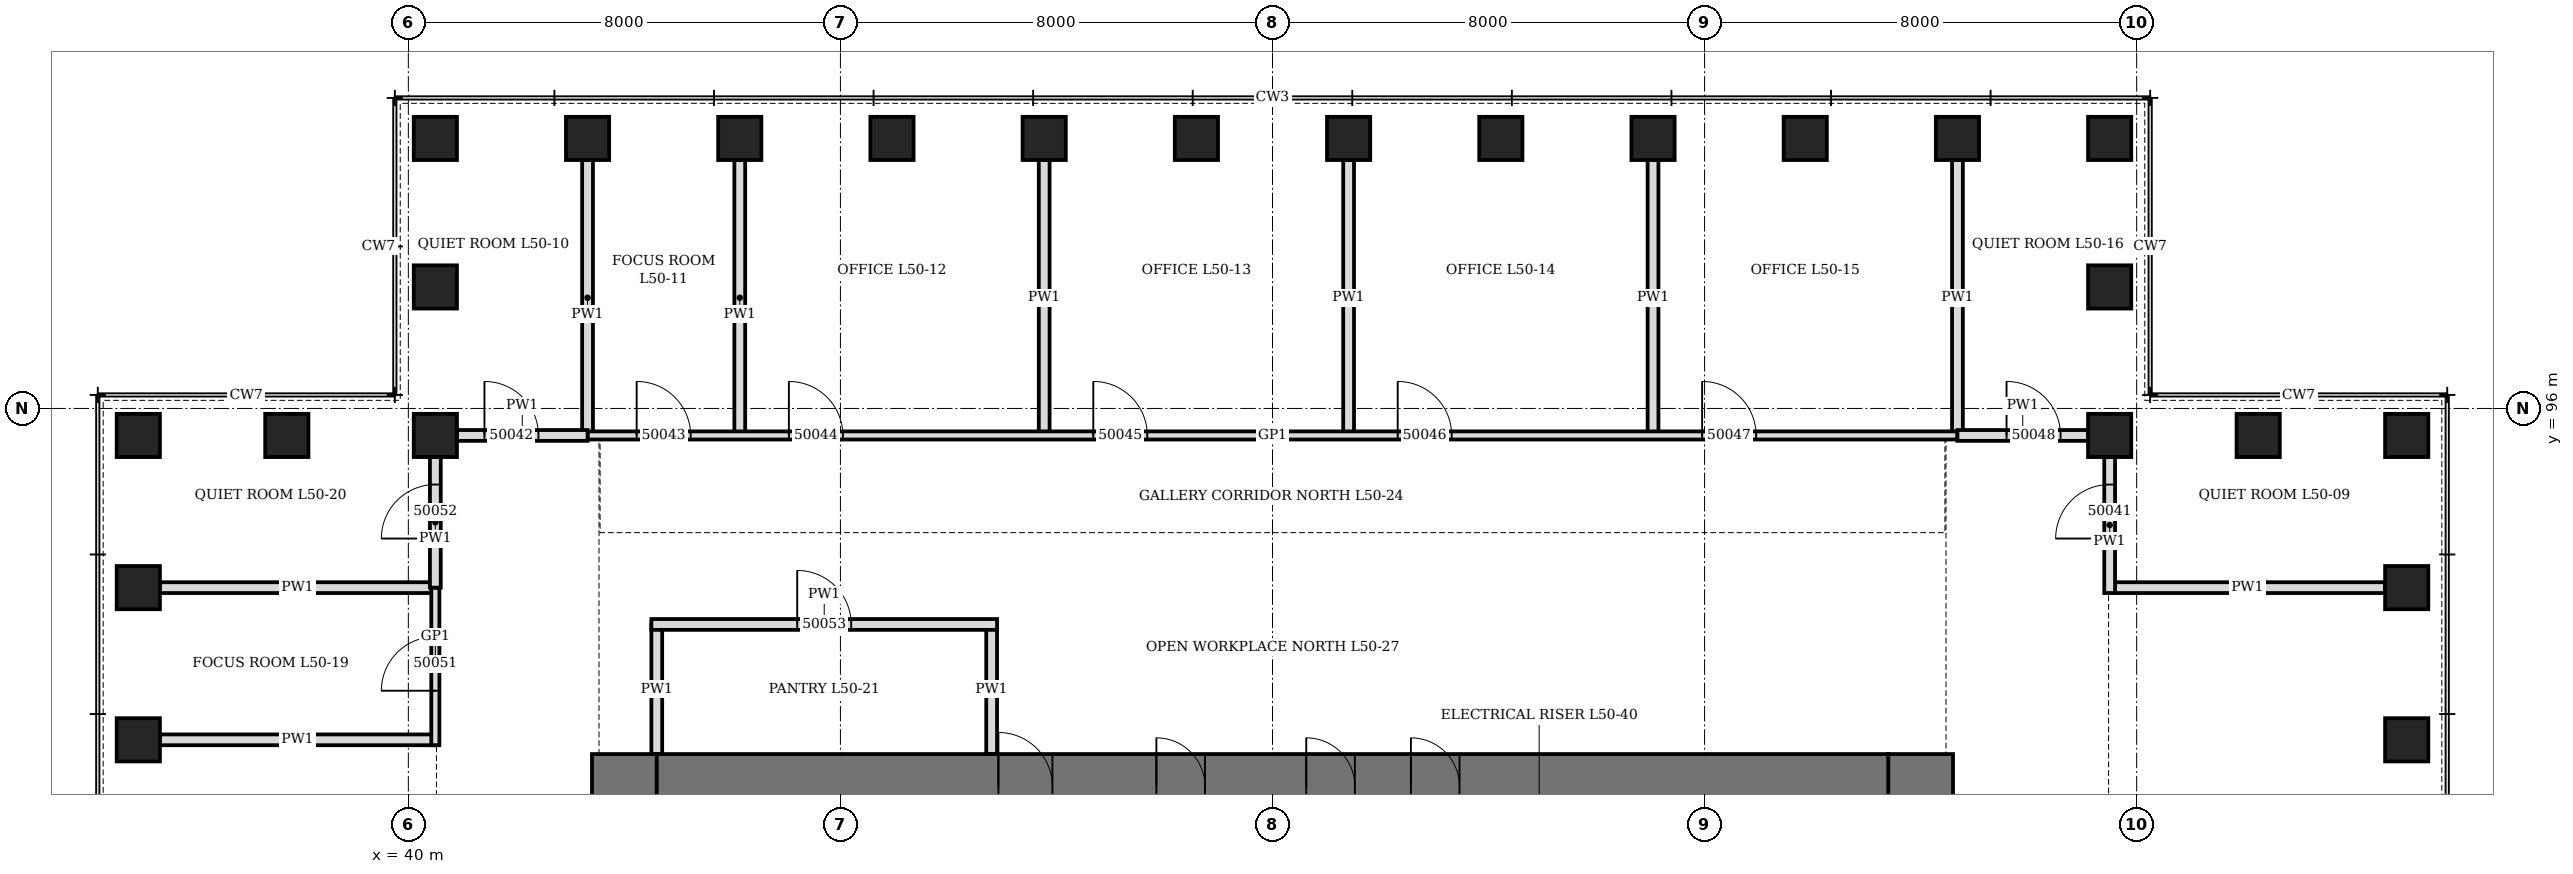
"""IFC4 building model, lengths in metres.
Left out: names, types, materials, properties, quantities, classifications, styles, units other than length and angle.
Written with IfcOpenShell. Run it as: python <this file> out.ifc"""

import sys

from ifc_helpers import new_model, si_unit, direction, frame, frame_2d, origin, origin_2d, place, context, subcontext, project, spatial, rectangle, hollow_rectangle, extrude, element, fill, save


model = new_model("IFC4")
c1 = context("Model", 3, precision=1e-05, world=origin(), true_north=direction((0.0, 1.0)))
c2 = subcontext(c1, "Body", "Model", "MODEL_VIEW")
j1 = project(units=[si_unit("LENGTHUNIT", "METRE"), si_unit("PLANEANGLEUNIT", "RADIAN")], contexts=[c1])
p1 = place(None, origin())
s1 = spatial("IfcSite", under=j1, at=p1, CompositionType="ELEMENT")
p2 = place(p1, origin())
s2 = spatial("IfcBuilding", under=s1, at=p2, CompositionType="ELEMENT")
p3 = place(p2, frame((0.0, 0.0, 223.3)))
s3 = spatial("IfcBuildingStorey", under=s2, at=p3, CompositionType="ELEMENT", Elevation=223.3)
for number, where, z_axis, x_axis in (
    (1, (77.0, 89.864, 0.0), (0.0, 0.0, 1.0), (0.0, 1.0, 0.0)),
    (2, (77.0, 92.682, 0.0), (0.0, 0.0, 1.0), (0.0, 1.0, 0.0)),
    (3, (77.0, 95.5, 0.0), (0.0, 0.0, 1.0), (1.0, 0.0, 0.0)),
    (4, (74.25, 95.5, 0.0), (0.0, 0.0, 1.0), (1.0, 0.0, 0.0)),
    (5, (71.5, 95.5, 0.0), (0.0, 0.0, 1.0), (0.0, 1.0, 0.0)),
    (6, (71.5, 98.25, 0.0), (0.0, 0.0, 1.0), (0.0, 1.0, 0.0)),
    (7, (71.5, 101.0, 0.0), (0.0, 0.0, 1.0), (1.0, 0.0, 0.0)),
    (8, (68.682, 101.0, 0.0), (0.0, 0.0, 1.0), (1.0, 0.0, 0.0)),
    (9, (65.864, 101.0, 0.0), (0.0, 0.0, 1.0), (1.0, 0.0, 0.0)),
    (10, (63.045, 101.0, 0.0), (0.0, 0.0, 1.0), (1.0, 0.0, 0.0)),
    (11, (60.227, 101.0, 0.0), (0.0, 0.0, 1.0), (1.0, 0.0, 0.0)),
    (12, (57.409, 101.0, 0.0), (0.0, 0.0, 1.0), (1.0, 0.0, 0.0)),
    (13, (54.591, 101.0, 0.0), (0.0, 0.0, 1.0), (1.0, 0.0, 0.0)),
    (14, (51.773, 101.0, 0.0), (0.0, 0.0, 1.0), (1.0, 0.0, 0.0)),
    (15, (48.955, 101.0, 0.0), (0.0, 0.0, 1.0), (1.0, 0.0, 0.0)),
    (16, (46.136, 101.0, 0.0), (0.0, 0.0, 1.0), (1.0, 0.0, 0.0)),
    (17, (43.318, 101.0, 0.0), (0.0, 0.0, 1.0), (1.0, 0.0, 0.0)),
    (18, (40.5, 101.0, 0.0), (0.0, 0.0, 1.0), (0.0, 1.0, 0.0)),
    (19, (40.5, 98.25, 0.0), (0.0, 0.0, 1.0), (0.0, 1.0, 0.0)),
    (20, (40.5, 95.5, 0.0), (0.0, 0.0, 1.0), (1.0, 0.0, 0.0)),
    (21, (37.75, 95.5, 0.0), (0.0, 0.0, 1.0), (1.0, 0.0, 0.0)),
    (22, (35.0, 95.5, 0.0), (0.0, 0.0, 1.0), (0.0, 1.0, 0.0)),
    (23, (35.0, 92.682, 0.0), (0.0, 0.0, 1.0), (0.0, 1.0, 0.0)),
    (24, (35.0, 89.864, 0.0), (0.0, 0.0, 1.0), (0.0, 1.0, 0.0)),
):
    element("IfcColumn", number, at=place(p3, frame(where, z_axis=z_axis, x_axis=x_axis)), inside=s3, PredefinedType="COLUMN", context=c2, shape_type="SweptSolid", body=[
        extrude(hollow_rectangle(XDim=0.8, YDim=0.8, WallThickness=0.08, at=origin_2d()), origin(), (0.0, 0.0, 1.0), 4.2),
    ])
p4 = place(p3, frame((44.0, 70.4, 0.0), z_axis=(0.0, 0.0, 1.0), x_axis=(0.0, 1.0, 0.0)))
e25 = element("IfcWall", 25, at=p4, inside=s3, PredefinedType="SHEAR", context=c2, shape_type="SweptSolid", body=[
    extrude(rectangle(XDim=19.2, YDim=1.2, at=frame_2d((9.6, 0.0))), origin(), (0.0, 0.0, 1.0), 4.2),
])
p5 = place(p4, frame((8.6, 0.0, 0.0)))
e26 = element("IfcOpeningElement", 26, at=p5, cuts=e25, PredefinedType="OPENING", context=c2, shape_type="SweptSolid", body=[
    extrude(rectangle(XDim=2.0, YDim=2.4, at=frame_2d((1.0, 1.2))), frame((0.0, 0.61, 0.0), z_axis=(0.0, -1.0, 0.0), x_axis=(1.0, 0.0, 0.0)), (0.0, 0.0, 1.0), 1.22),
])
p6 = place(p3, frame((68.0, 70.4, 0.0), z_axis=(0.0, 0.0, 1.0), x_axis=(0.0, 1.0, 0.0)))
e27 = element("IfcWall", 27, at=p6, inside=s3, PredefinedType="SHEAR", context=c2, shape_type="SweptSolid", body=[
    extrude(rectangle(XDim=19.2, YDim=1.2, at=frame_2d((9.6, 0.0))), origin(), (0.0, 0.0, 1.0), 4.2),
])
p7 = place(p6, frame((8.6, 0.0, 0.0)))
e28 = element("IfcOpeningElement", 28, at=p7, cuts=e27, PredefinedType="OPENING", context=c2, shape_type="SweptSolid", body=[
    extrude(rectangle(XDim=2.0, YDim=2.4, at=frame_2d((1.0, 1.2))), frame((0.0, 0.61, 0.0), z_axis=(0.0, -1.0, 0.0), x_axis=(1.0, 0.0, 0.0)), (0.0, 0.0, 1.0), 1.22),
])
p8 = place(p3, frame((44.6, 89.0, 0.0), z_axis=(0.0, 0.0, 1.0), x_axis=(1.0, 0.0, 0.0)))
e29 = element("IfcWall", 29, at=p8, inside=s3, PredefinedType="SHEAR", context=c2, shape_type="SweptSolid", body=[
    extrude(rectangle(XDim=22.8, YDim=1.2, at=frame_2d((11.4, 0.0))), origin(), (0.0, 0.0, 1.0), 4.2),
])
p9 = place(p8, frame((6.325, 0.0, 0.0)))
e30 = element("IfcOpeningElement", 30, at=p9, cuts=e29, PredefinedType="OPENING", context=c2, shape_type="SweptSolid", body=[
    extrude(rectangle(XDim=1.0, YDim=2.1, at=frame_2d((0.5, 1.05))), frame((0.0, 0.61, 0.0), z_axis=(0.0, -1.0, 0.0), x_axis=(1.0, 0.0, 0.0)), (0.0, 0.0, 1.0), 1.22),
])
p10 = place(p8, frame((9.25, 0.0, 0.0)))
e31 = element("IfcOpeningElement", 31, at=p10, cuts=e29, PredefinedType="OPENING", context=c2, shape_type="SweptSolid", body=[
    extrude(rectangle(XDim=0.9, YDim=2.1, at=frame_2d((0.45, 1.05))), frame((0.0, 0.61, 0.0), z_axis=(0.0, -1.0, 0.0), x_axis=(1.0, 0.0, 0.0)), (0.0, 0.0, 1.0), 1.22),
])
p11 = place(p8, frame((12.025, 0.0, 0.0)))
e32 = element("IfcOpeningElement", 32, at=p11, cuts=e29, PredefinedType="OPENING", context=c2, shape_type="SweptSolid", body=[
    extrude(rectangle(XDim=0.9, YDim=2.1, at=frame_2d((0.45, 1.05))), frame((0.0, 0.61, 0.0), z_axis=(0.0, -1.0, 0.0), x_axis=(1.0, 0.0, 0.0)), (0.0, 0.0, 1.0), 1.22),
])
p12 = place(p8, frame((13.962, 0.0, 0.0)))
e33 = element("IfcOpeningElement", 33, at=p12, cuts=e29, PredefinedType="OPENING", context=c2, shape_type="SweptSolid", body=[
    extrude(rectangle(XDim=0.9, YDim=2.1, at=frame_2d((0.45, 1.05))), frame((0.0, 0.61, 0.0), z_axis=(0.0, -1.0, 0.0), x_axis=(1.0, 0.0, 0.0)), (0.0, 0.0, 1.0), 1.22),
])
for number, where, z_axis, x_axis in (
    (34, (71.5, 92.682, 0.0), (0.0, 0.0, 1.0), (1.0, 0.0, 0.0)),
    (35, (43.318, 95.5, 0.0), (0.0, 0.0, 1.0), (0.0, 1.0, 0.0)),
    (36, (46.136, 95.5, 0.0), (0.0, 0.0, 1.0), (0.0, 1.0, 0.0)),
    (37, (51.773, 95.5, 0.0), (0.0, 0.0, 1.0), (0.0, 1.0, 0.0)),
    (38, (57.409, 95.5, 0.0), (0.0, 0.0, 1.0), (0.0, 1.0, 0.0)),
    (39, (63.045, 95.5, 0.0), (0.0, 0.0, 1.0), (0.0, 1.0, 0.0)),
    (40, (68.682, 95.5, 0.0), (0.0, 0.0, 1.0), (0.0, 1.0, 0.0)),
    (41, (35.4, 89.864, 0.0), (0.0, 0.0, 1.0), (1.0, 0.0, 0.0)),
    (42, (35.4, 92.682, 0.0), (0.0, 0.0, 1.0), (1.0, 0.0, 0.0)),
):
    element("IfcWall", number, at=place(p3, frame(where, z_axis=z_axis, x_axis=x_axis)), inside=s3, PredefinedType="PARTITIONING", context=c2, shape_type="SweptSolid", body=[
        extrude(rectangle(XDim=5.1, YDim=0.2, at=frame_2d((2.55, 0.0))), origin(), (0.0, 0.0, 1.0), 3.428),
    ])
for number, where, z_axis, x_axis in (
    (43, (44.6, 89.6, 0.0), (0.0, 0.0, 1.0), (0.0, 1.0, 0.0)),
    (44, (50.8, 89.6, 0.0), (0.0, 0.0, 1.0), (0.0, 1.0, 0.0)),
):
    element("IfcWall", number, at=place(p3, frame(where, z_axis=z_axis, x_axis=x_axis)), inside=s3, PredefinedType="PARTITIONING", context=c2, shape_type="SweptSolid", body=[
        extrude(rectangle(XDim=2.4, YDim=0.2, at=frame_2d((1.2, 0.0))), origin(), (0.0, 0.0, 1.0), 4.04),
    ])
p13 = place(p3, frame((44.5, 92.0, 0.0), z_axis=(0.0, 0.0, 1.0), x_axis=(1.0, 0.0, 0.0)))
e45 = element("IfcWall", 45, at=p13, inside=s3, PredefinedType="PARTITIONING", context=c2, shape_type="SweptSolid", body=[
    extrude(rectangle(XDim=6.4, YDim=0.2, at=frame_2d((3.2, 0.0))), origin(), (0.0, 0.0, 1.0), 4.04),
])
p14 = place(p13, frame((2.7, 0.0, 0.0)))
e46 = element("IfcOpeningElement", 46, at=p14, cuts=e45, PredefinedType="OPENING", context=c2, shape_type="SweptSolid", body=[
    extrude(rectangle(XDim=1.0, YDim=2.1, at=frame_2d((0.5, 1.05))), frame((0.0, 0.11, 0.0), z_axis=(0.0, -1.0, 0.0), x_axis=(1.0, 0.0, 0.0)), (0.0, 0.0, 1.0), 0.22),
])
p15 = place(p3, frame((43.318, 95.5, 0.0), z_axis=(0.0, 0.0, 1.0), x_axis=(1.0, 0.0, 0.0)))
e47 = element("IfcWall", 47, at=p15, inside=s3, PredefinedType="PARTITIONING", context=c2, shape_type="SweptSolid", body=[
    extrude(rectangle(XDim=25.364, YDim=0.15, at=frame_2d((12.682, 0.0))), origin(), (0.0, 0.0, 1.0), 4.04),
])
p16 = place(p15, frame((0.909, 0.0, 0.0)))
e48 = element("IfcOpeningElement", 48, at=p16, cuts=e47, PredefinedType="OPENING", context=c2, shape_type="SweptSolid", body=[
    extrude(rectangle(XDim=1.0, YDim=2.4, at=frame_2d((0.5, 1.2))), frame((0.0, 0.085, 0.0), z_axis=(0.0, -1.0, 0.0), x_axis=(1.0, 0.0, 0.0)), (0.0, 0.0, 1.0), 0.17),
])
p17 = place(p15, frame((3.727, 0.0, 0.0)))
e49 = element("IfcOpeningElement", 49, at=p17, cuts=e47, PredefinedType="OPENING", context=c2, shape_type="SweptSolid", body=[
    extrude(rectangle(XDim=1.0, YDim=2.1, at=frame_2d((0.5, 1.05))), frame((0.0, 0.085, 0.0), z_axis=(0.0, -1.0, 0.0), x_axis=(1.0, 0.0, 0.0)), (0.0, 0.0, 1.0), 0.17),
])
p18 = place(p15, frame((9.364, 0.0, 0.0)))
e50 = element("IfcOpeningElement", 50, at=p18, cuts=e47, PredefinedType="OPENING", context=c2, shape_type="SweptSolid", body=[
    extrude(rectangle(XDim=1.0, YDim=2.1, at=frame_2d((0.5, 1.05))), frame((0.0, 0.085, 0.0), z_axis=(0.0, -1.0, 0.0), x_axis=(1.0, 0.0, 0.0)), (0.0, 0.0, 1.0), 0.17),
])
p19 = place(p15, frame((15.0, 0.0, 0.0)))
e51 = element("IfcOpeningElement", 51, at=p19, cuts=e47, PredefinedType="OPENING", context=c2, shape_type="SweptSolid", body=[
    extrude(rectangle(XDim=1.0, YDim=2.1, at=frame_2d((0.5, 1.05))), frame((0.0, 0.085, 0.0), z_axis=(0.0, -1.0, 0.0), x_axis=(1.0, 0.0, 0.0)), (0.0, 0.0, 1.0), 0.17),
])
p20 = place(p15, frame((20.636, 0.0, 0.0)))
e52 = element("IfcOpeningElement", 52, at=p20, cuts=e47, PredefinedType="OPENING", context=c2, shape_type="SweptSolid", body=[
    extrude(rectangle(XDim=1.0, YDim=2.1, at=frame_2d((0.5, 1.05))), frame((0.0, 0.085, 0.0), z_axis=(0.0, -1.0, 0.0), x_axis=(1.0, 0.0, 0.0)), (0.0, 0.0, 1.0), 0.17),
])
p21 = place(p3, frame((40.9, 95.5, 0.0), z_axis=(0.0, 0.0, 1.0), x_axis=(1.0, 0.0, 0.0)))
e53 = element("IfcWall", 53, at=p21, inside=s3, PredefinedType="PARTITIONING", context=c2, shape_type="SweptSolid", body=[
    extrude(rectangle(XDim=2.418, YDim=0.2, at=frame_2d((1.209, 0.0))), origin(), (0.0, 0.0, 1.0), 4.04),
])
p22 = place(p21, frame((0.509, 0.0, 0.0)))
e54 = element("IfcOpeningElement", 54, at=p22, cuts=e53, PredefinedType="OPENING", context=c2, shape_type="SweptSolid", body=[
    extrude(rectangle(XDim=1.0, YDim=2.1, at=frame_2d((0.5, 1.05))), frame((0.0, 0.11, 0.0), z_axis=(0.0, -1.0, 0.0), x_axis=(1.0, 0.0, 0.0)), (0.0, 0.0, 1.0), 0.22),
])
p23 = place(p3, frame((68.682, 95.5, 0.0), z_axis=(0.0, 0.0, 1.0), x_axis=(1.0, 0.0, 0.0)))
e55 = element("IfcWall", 55, at=p23, inside=s3, PredefinedType="PARTITIONING", context=c2, shape_type="SweptSolid", body=[
    extrude(rectangle(XDim=2.418, YDim=0.2, at=frame_2d((1.209, 0.0))), origin(), (0.0, 0.0, 1.0), 4.04),
])
p24 = place(p23, frame((0.909, 0.0, 0.0)))
e56 = element("IfcOpeningElement", 56, at=p24, cuts=e55, PredefinedType="OPENING", context=c2, shape_type="SweptSolid", body=[
    extrude(rectangle(XDim=1.0, YDim=2.1, at=frame_2d((0.5, 1.05))), frame((0.0, 0.11, 0.0), z_axis=(0.0, -1.0, 0.0), x_axis=(1.0, 0.0, 0.0)), (0.0, 0.0, 1.0), 0.22),
])
p25 = place(p3, frame((40.5, 89.764, 0.0), z_axis=(0.0, 0.0, 1.0), x_axis=(0.0, 1.0, 0.0)))
e57 = element("IfcWall", 57, at=p25, inside=s3, PredefinedType="PARTITIONING", context=c2, shape_type="SweptSolid", body=[
    extrude(rectangle(XDim=2.918, YDim=0.15, at=frame_2d((1.459, 0.0))), origin(), (0.0, 0.0, 1.0), 4.04),
])
p26 = place(p25, frame((1.009, 0.0, 0.0)))
e58 = element("IfcOpeningElement", 58, at=p26, cuts=e57, PredefinedType="OPENING", context=c2, shape_type="SweptSolid", body=[
    extrude(rectangle(XDim=1.0, YDim=2.4, at=frame_2d((0.5, 1.2))), frame((0.0, 0.085, 0.0), z_axis=(0.0, -1.0, 0.0), x_axis=(1.0, 0.0, 0.0)), (0.0, 0.0, 1.0), 0.17),
])
p27 = place(p3, frame((40.5, 92.682, 0.0), z_axis=(0.0, 0.0, 1.0), x_axis=(0.0, 1.0, 0.0)))
e59 = element("IfcWall", 59, at=p27, inside=s3, PredefinedType="PARTITIONING", context=c2, shape_type="SweptSolid", body=[
    extrude(rectangle(XDim=2.418, YDim=0.2, at=frame_2d((1.209, 0.0))), origin(), (0.0, 0.0, 1.0), 4.04),
])
p28 = place(p27, frame((0.909, 0.0, 0.0)))
e60 = element("IfcOpeningElement", 60, at=p28, cuts=e59, PredefinedType="OPENING", context=c2, shape_type="SweptSolid", body=[
    extrude(rectangle(XDim=1.0, YDim=2.1, at=frame_2d((0.5, 1.05))), frame((0.0, 0.11, 0.0), z_axis=(0.0, -1.0, 0.0), x_axis=(1.0, 0.0, 0.0)), (0.0, 0.0, 1.0), 0.22),
])
p29 = place(p3, frame((71.5, 92.582, 0.0), z_axis=(0.0, 0.0, 1.0), x_axis=(0.0, 1.0, 0.0)))
e61 = element("IfcWall", 61, at=p29, inside=s3, PredefinedType="PARTITIONING", context=c2, shape_type="SweptSolid", body=[
    extrude(rectangle(XDim=2.518, YDim=0.2, at=frame_2d((1.259, 0.0))), origin(), (0.0, 0.0, 1.0), 4.04),
])
p30 = place(p29, frame((1.009, 0.0, 0.0)))
e62 = element("IfcOpeningElement", 62, at=p30, cuts=e61, PredefinedType="OPENING", context=c2, shape_type="SweptSolid", body=[
    extrude(rectangle(XDim=1.0, YDim=2.1, at=frame_2d((0.5, 1.05))), frame((0.0, 0.11, 0.0), z_axis=(0.0, -1.0, 0.0), x_axis=(1.0, 0.0, 0.0)), (0.0, 0.0, 1.0), 0.22),
])
p31 = place(p9, origin())
e63 = element("IfcDoor", 63, at=p31, inside=s3, OperationType="SINGLE_SWING_LEFT", PredefinedType="DOOR", context=c2, shape_type="SweptSolid", body=[
    extrude(rectangle(XDim=1.0, YDim=2.1, at=frame_2d((0.5, 1.05))), frame((0.0, 0.35, 0.0), z_axis=(0.0, -1.0, 0.0), x_axis=(1.0, 0.0, 0.0)), (0.0, 0.0, 1.0), 0.7),
])
fill(e30, e63)
p32 = place(p10, origin())
e64 = element("IfcDoor", 64, at=p32, inside=s3, OperationType="SINGLE_SWING_LEFT", PredefinedType="DOOR", context=c2, shape_type="SweptSolid", body=[
    extrude(rectangle(XDim=0.9, YDim=2.1, at=frame_2d((0.45, 1.05))), frame((0.0, 0.35, 0.0), z_axis=(0.0, -1.0, 0.0), x_axis=(1.0, 0.0, 0.0)), (0.0, 0.0, 1.0), 0.7),
])
fill(e31, e64)
p33 = place(p11, origin())
e65 = element("IfcDoor", 65, at=p33, inside=s3, OperationType="SINGLE_SWING_LEFT", PredefinedType="DOOR", context=c2, shape_type="SweptSolid", body=[
    extrude(rectangle(XDim=0.9, YDim=2.1, at=frame_2d((0.45, 1.05))), frame((0.0, 0.35, 0.0), z_axis=(0.0, -1.0, 0.0), x_axis=(1.0, 0.0, 0.0)), (0.0, 0.0, 1.0), 0.7),
])
fill(e32, e65)
p34 = place(p12, origin())
e66 = element("IfcDoor", 66, at=p34, inside=s3, OperationType="SINGLE_SWING_LEFT", PredefinedType="DOOR", context=c2, shape_type="SweptSolid", body=[
    extrude(rectangle(XDim=0.9, YDim=2.1, at=frame_2d((0.45, 1.05))), frame((0.0, 0.35, 0.0), z_axis=(0.0, -1.0, 0.0), x_axis=(1.0, 0.0, 0.0)), (0.0, 0.0, 1.0), 0.7),
])
fill(e33, e66)
p35 = place(p30, origin())
e67 = element("IfcDoor", 67, at=p35, inside=s3, OperationType="SINGLE_SWING_LEFT", PredefinedType="DOOR", context=c2, shape_type="SweptSolid", body=[
    extrude(rectangle(XDim=1.0, YDim=2.1, at=frame_2d((0.5, 1.05))), frame((0.0, 0.1, 0.0), z_axis=(0.0, -1.0, 0.0), x_axis=(1.0, 0.0, 0.0)), (0.0, 0.0, 1.0), 0.199),
])
fill(e62, e67)
p36 = place(p22, origin())
e68 = element("IfcDoor", 68, at=p36, inside=s3, OperationType="SINGLE_SWING_LEFT", PredefinedType="DOOR", context=c2, shape_type="SweptSolid", body=[
    extrude(rectangle(XDim=1.0, YDim=2.1, at=frame_2d((0.5, 1.05))), frame((0.0, 0.1, 0.0), z_axis=(0.0, -1.0, 0.0), x_axis=(1.0, 0.0, 0.0)), (0.0, 0.0, 1.0), 0.199),
])
fill(e54, e68)
p37 = place(p16, origin())
e69 = element("IfcDoor", 69, at=p37, inside=s3, OperationType="SINGLE_SWING_RIGHT", PredefinedType="DOOR", context=c2, shape_type="SweptSolid", body=[
    extrude(rectangle(XDim=1.0, YDim=2.4, at=frame_2d((0.5, 1.2))), frame((0.0, 0.075, 0.0), z_axis=(0.0, -1.0, 0.0), x_axis=(1.0, 0.0, 0.0)), (0.0, 0.0, 1.0), 0.149),
])
fill(e48, e69)
p38 = place(p17, origin())
e70 = element("IfcDoor", 70, at=p38, inside=s3, OperationType="SINGLE_SWING_LEFT", PredefinedType="DOOR", context=c2, shape_type="SweptSolid", body=[
    extrude(rectangle(XDim=1.0, YDim=2.1, at=frame_2d((0.5, 1.05))), frame((0.0, 0.075, 0.0), z_axis=(0.0, -1.0, 0.0), x_axis=(1.0, 0.0, 0.0)), (0.0, 0.0, 1.0), 0.149),
])
fill(e49, e70)
p39 = place(p18, origin())
e71 = element("IfcDoor", 71, at=p39, inside=s3, OperationType="SINGLE_SWING_LEFT", PredefinedType="DOOR", context=c2, shape_type="SweptSolid", body=[
    extrude(rectangle(XDim=1.0, YDim=2.1, at=frame_2d((0.5, 1.05))), frame((0.0, 0.075, 0.0), z_axis=(0.0, -1.0, 0.0), x_axis=(1.0, 0.0, 0.0)), (0.0, 0.0, 1.0), 0.149),
])
fill(e50, e71)
p40 = place(p19, origin())
e72 = element("IfcDoor", 72, at=p40, inside=s3, OperationType="SINGLE_SWING_LEFT", PredefinedType="DOOR", context=c2, shape_type="SweptSolid", body=[
    extrude(rectangle(XDim=1.0, YDim=2.1, at=frame_2d((0.5, 1.05))), frame((0.0, 0.075, 0.0), z_axis=(0.0, -1.0, 0.0), x_axis=(1.0, 0.0, 0.0)), (0.0, 0.0, 1.0), 0.149),
])
fill(e51, e72)
p41 = place(p20, origin())
e73 = element("IfcDoor", 73, at=p41, inside=s3, OperationType="SINGLE_SWING_LEFT", PredefinedType="DOOR", context=c2, shape_type="SweptSolid", body=[
    extrude(rectangle(XDim=1.0, YDim=2.1, at=frame_2d((0.5, 1.05))), frame((0.0, 0.075, 0.0), z_axis=(0.0, -1.0, 0.0), x_axis=(1.0, 0.0, 0.0)), (0.0, 0.0, 1.0), 0.149),
])
fill(e52, e73)
p42 = place(p24, origin())
e74 = element("IfcDoor", 74, at=p42, inside=s3, OperationType="SINGLE_SWING_LEFT", PredefinedType="DOOR", context=c2, shape_type="SweptSolid", body=[
    extrude(rectangle(XDim=1.0, YDim=2.1, at=frame_2d((0.5, 1.05))), frame((0.0, 0.1, 0.0), z_axis=(0.0, -1.0, 0.0), x_axis=(1.0, 0.0, 0.0)), (0.0, 0.0, 1.0), 0.199),
])
fill(e56, e74)
p43 = place(p26, origin())
e75 = element("IfcDoor", 75, at=p43, inside=s3, OperationType="SINGLE_SWING_RIGHT", PredefinedType="DOOR", context=c2, shape_type="SweptSolid", body=[
    extrude(rectangle(XDim=1.0, YDim=2.4, at=frame_2d((0.5, 1.2))), frame((0.0, 0.075, 0.0), z_axis=(0.0, -1.0, 0.0), x_axis=(1.0, 0.0, 0.0)), (0.0, 0.0, 1.0), 0.149),
])
fill(e58, e75)
p44 = place(p28, origin())
e76 = element("IfcDoor", 76, at=p44, inside=s3, OperationType="SINGLE_SWING_LEFT", PredefinedType="DOOR", context=c2, shape_type="SweptSolid", body=[
    extrude(rectangle(XDim=1.0, YDim=2.1, at=frame_2d((0.5, 1.05))), frame((0.0, 0.1, 0.0), z_axis=(0.0, -1.0, 0.0), x_axis=(1.0, 0.0, 0.0)), (0.0, 0.0, 1.0), 0.199),
])
fill(e60, e76)
p45 = place(p14, origin())
e77 = element("IfcDoor", 77, at=p45, inside=s3, OperationType="SINGLE_SWING_LEFT", PredefinedType="DOOR", context=c2, shape_type="SweptSolid", body=[
    extrude(rectangle(XDim=1.0, YDim=2.1, at=frame_2d((0.5, 1.05))), frame((0.0, 0.1, 0.0), z_axis=(0.0, -1.0, 0.0), x_axis=(1.0, 0.0, 0.0)), (0.0, 0.0, 1.0), 0.199),
])
fill(e46, e77)
save(model, sys.argv[1])
